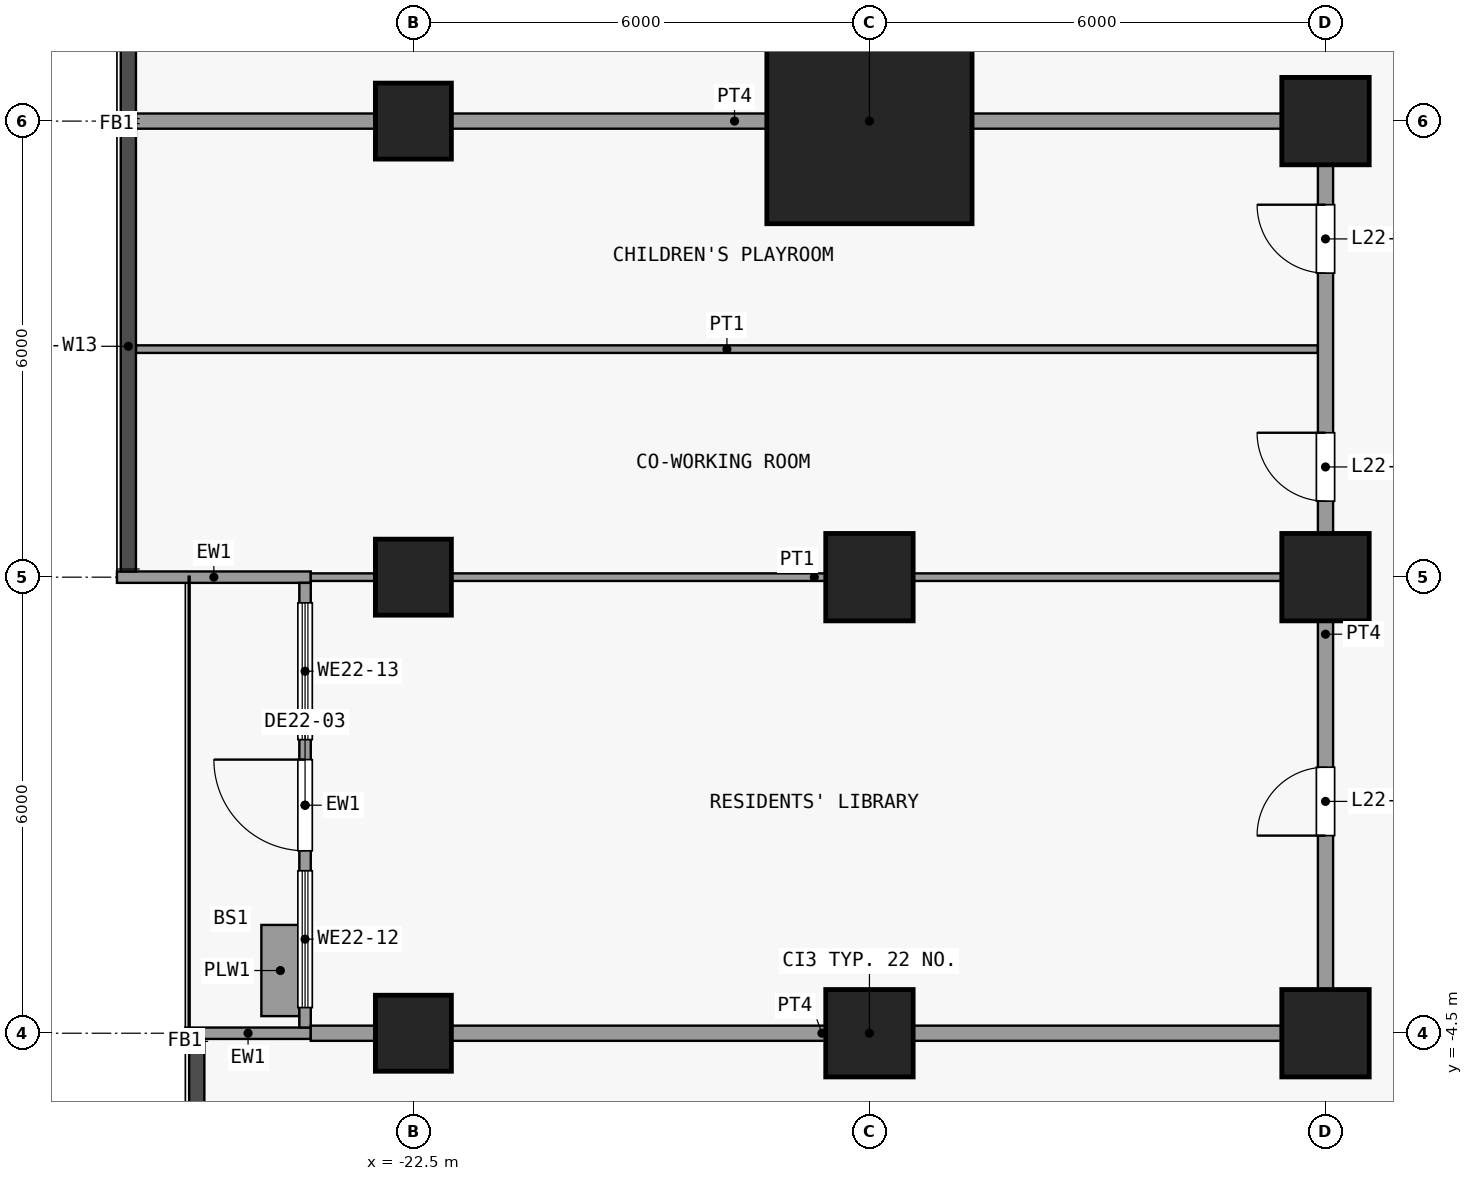
"""IFC4 building model, lengths in metres.
Left out: names, types, materials, properties, quantities, classifications, styles, units other than length and angle.
Written with IfcOpenShell. Run it as: python <this file> out.ifc"""

import sys

from ifc_helpers import new_model, si_unit, direction, frame, frame_2d, origin, origin_2d, place, context, subcontext, project, spatial, rectangle, extrude, element, fill, save


model = new_model("IFC4")
c1 = context("Model", 3, precision=1e-05, world=origin(), true_north=direction((0.0, 1.0)))
c2 = subcontext(c1, "Body", "Model", "MODEL_VIEW")
j1 = project(units=[si_unit("LENGTHUNIT", "METRE"), si_unit("PLANEANGLEUNIT", "RADIAN")], contexts=[c1])
p1 = place(None, origin())
s1 = spatial("IfcSite", under=j1, at=p1, CompositionType="ELEMENT")
p2 = place(p1, origin())
s2 = spatial("IfcBuilding", under=s1, at=p2, CompositionType="ELEMENT")
p3 = place(p2, frame((0.0, 0.0, 91.9)))
s3 = spatial("IfcBuildingStorey", under=s2, at=p3, CompositionType="ELEMENT", Elevation=91.9)
for number, where, z_axis, x_axis in (
    (1, (-22.5, -4.5, 0.0), (0.0, 0.0, 1.0), (1.0, 0.0, 0.0)),
    (2, (-22.5, 1.5, 0.0), (0.0, 0.0, 1.0), (1.0, 0.0, 0.0)),
    (3, (-22.5, 7.5, 0.0), (0.0, 0.0, 1.0), (1.0, 0.0, 0.0)),
):
    element("IfcColumn", number, at=place(p3, frame(where, z_axis=z_axis, x_axis=x_axis)), inside=s3, PredefinedType="COLUMN", context=c2, shape_type="SweptSolid", body=[
        extrude(rectangle(XDim=1.0, YDim=1.0, at=origin_2d()), origin(), (0.0, 0.0, 1.0), 3.6),
    ])
for number, where, z_axis, x_axis in (
    (4, (-16.5, -4.5, 0.0), (0.0, 0.0, 1.0), (1.0, 0.0, 0.0)),
    (5, (-16.5, 1.5, 0.0), (0.0, 0.0, 1.0), (1.0, 0.0, 0.0)),
):
    element("IfcColumn", number, at=place(p3, frame(where, z_axis=z_axis, x_axis=x_axis)), inside=s3, PredefinedType="COLUMN", context=c2, shape_type="SweptSolid", body=[
        extrude(rectangle(XDim=1.15, YDim=1.15, at=origin_2d()), origin(), (0.0, 0.0, 1.0), 3.6),
    ])
p4 = place(p3, frame((-16.5, 7.5, 0.0), z_axis=(0.0, 0.0, 1.0), x_axis=(1.0, 0.0, 0.0)))
e6 = element("IfcColumn", 6, at=p4, inside=s3, PredefinedType="COLUMN", context=c2, shape_type="SweptSolid", body=[
    extrude(rectangle(XDim=2.7, YDim=2.7, at=origin_2d()), origin(), (0.0, 0.0, 1.0), 3.6),
])
for number, where, z_axis, x_axis in (
    (7, (-10.5, -4.5, 0.0), (0.0, 0.0, 1.0), (1.0, 0.0, 0.0)),
    (8, (-10.5, 1.5, 0.0), (0.0, 0.0, 1.0), (1.0, 0.0, 0.0)),
    (9, (-10.5, 7.5, 0.0), (0.0, 0.0, 1.0), (1.0, 0.0, 0.0)),
):
    element("IfcColumn", number, at=place(p3, frame(where, z_axis=z_axis, x_axis=x_axis)), inside=s3, PredefinedType="COLUMN", context=c2, shape_type="SweptSolid", body=[
        extrude(rectangle(XDim=1.15, YDim=1.15, at=origin_2d()), origin(), (0.0, 0.0, 1.0), 3.6),
    ])
p5 = place(p3, frame((-23.85, -4.5, 0.0), z_axis=(0.0, 0.0, 1.0), x_axis=(-1.0, 0.0, 0.0)))
e10 = element("IfcWall", 10, at=p5, inside=s3, PredefinedType="SOLIDWALL", context=c2, shape_type="SweptSolid", body=[
    extrude(rectangle(XDim=1.65, YDim=0.15, at=frame_2d((0.825, 0.0))), origin(), (0.0, 0.0, 1.0), 3.3),
])
p6 = place(p3, frame((-23.85, 1.5, 0.0), z_axis=(0.0, 0.0, 1.0), x_axis=(-1.0, 0.0, 0.0)))
e11 = element("IfcWall", 11, at=p6, inside=s3, PredefinedType="SOLIDWALL", context=c2, shape_type="SweptSolid", body=[
    extrude(rectangle(XDim=2.55, YDim=0.15, at=frame_2d((1.275, 0.0))), origin(), (0.0, 0.0, 1.0), 3.3),
])
p7 = place(p3, frame((-23.925, -4.425, 0.0), z_axis=(0.0, 0.0, 1.0), x_axis=(0.0, 1.0, 0.0)))
e12 = element("IfcWall", 12, at=p7, inside=s3, PredefinedType="SOLIDWALL", context=c2, shape_type="SweptSolid", body=[
    extrude(rectangle(XDim=5.85, YDim=0.15, at=frame_2d((2.925, 0.0))), origin(), (0.0, 0.0, 1.0), 3.3),
])
p8 = place(p7, frame((2.325, 0.0, 0.0)))
e13 = element("IfcOpeningElement", 13, at=p8, cuts=e12, PredefinedType="OPENING", context=c2, shape_type="SweptSolid", body=[
    extrude(rectangle(XDim=1.2, YDim=2.4, at=frame_2d((0.6, 1.2))), frame((0.0, 0.085, 0.0), z_axis=(0.0, -1.0, 0.0), x_axis=(1.0, 0.0, 0.0)), (0.0, 0.0, 1.0), 0.17),
])
p9 = place(p7, frame((0.262, 0.0, 0.9)))
e14 = element("IfcOpeningElement", 14, at=p9, cuts=e12, PredefinedType="OPENING", context=c2, shape_type="SweptSolid", body=[
    extrude(rectangle(XDim=1.8, YDim=2.1, at=frame_2d((0.9, 1.05))), frame((0.0, 0.085, 0.0), z_axis=(0.0, -1.0, 0.0), x_axis=(1.0, 0.0, 0.0)), (0.0, 0.0, 1.0), 0.17),
])
p10 = place(p7, frame((3.788, 0.0, 0.9)))
e15 = element("IfcOpeningElement", 15, at=p10, cuts=e12, PredefinedType="OPENING", context=c2, shape_type="SweptSolid", body=[
    extrude(rectangle(XDim=1.8, YDim=2.1, at=frame_2d((0.9, 1.05))), frame((0.0, 0.085, 0.0), z_axis=(0.0, -1.0, 0.0), x_axis=(1.0, 0.0, 0.0)), (0.0, 0.0, 1.0), 0.17),
])
p11 = place(p3, frame((-24.25, -4.275, 0.0), z_axis=(0.0, 0.0, 1.0), x_axis=(0.0, 1.0, 0.0)))
e16 = element("IfcWall", 16, at=p11, inside=s3, PredefinedType="USERDEFINED", context=c2, shape_type="SweptSolid", body=[
    extrude(rectangle(XDim=1.2, YDim=0.5, at=frame_2d((0.6, 0.0))), origin(), (0.0, 0.0, 1.0), 0.9),
])
p12 = place(p3, frame((-23.85, -4.5, 0.0), z_axis=(0.0, 0.0, 1.0), x_axis=(1.0, 0.0, 0.0)))
e17 = element("IfcWall", 17, at=p12, inside=s3, PredefinedType="PARTITIONING", context=c2, shape_type="SweptSolid", body=[
    extrude(rectangle(XDim=13.45, YDim=0.2, at=frame_2d((6.725, 0.0))), origin(), (0.0, 0.0, 1.0), 3.3),
])
p13 = place(p3, frame((-23.85, 1.5, 0.0), z_axis=(0.0, 0.0, 1.0), x_axis=(1.0, 0.0, 0.0)))
e18 = element("IfcWall", 18, at=p13, inside=s3, PredefinedType="PARTITIONING", context=c2, shape_type="SweptSolid", body=[
    extrude(rectangle(XDim=13.25, YDim=0.1, at=frame_2d((6.625, 0.0))), origin(), (0.0, 0.0, 1.0), 3.3),
])
p14 = place(p3, frame((-26.15, 4.5, 0.0), z_axis=(0.0, 0.0, 1.0), x_axis=(1.0, 0.0, 0.0)))
e19 = element("IfcWall", 19, at=p14, inside=s3, PredefinedType="PARTITIONING", context=c2, shape_type="SweptSolid", body=[
    extrude(rectangle(XDim=15.55, YDim=0.1, at=frame_2d((7.775, 0.0))), origin(), (0.0, 0.0, 1.0), 3.3),
])
p15 = place(p3, frame((-26.15, 7.5, 0.0), z_axis=(0.0, 0.0, 1.0), x_axis=(1.0, 0.0, 0.0)))
e20 = element("IfcWall", 20, at=p15, inside=s3, PredefinedType="PARTITIONING", context=c2, shape_type="SweptSolid", body=[
    extrude(rectangle(XDim=15.75, YDim=0.2, at=frame_2d((7.875, 0.0))), origin(), (0.0, 0.0, 1.0), 3.3),
])
p16 = place(p3, frame((-10.5, -4.4, 0.0), z_axis=(0.0, 0.0, 1.0), x_axis=(0.0, 1.0, 0.0)))
e21 = element("IfcWall", 21, at=p16, inside=s3, PredefinedType="PARTITIONING", context=c2, shape_type="SweptSolid", body=[
    extrude(rectangle(XDim=11.8, YDim=0.2, at=frame_2d((5.9, 0.0))), origin(), (0.0, 0.0, 1.0), 3.3),
])
p17 = place(p16, frame((2.5, 0.0, 0.0)))
e22 = element("IfcOpeningElement", 22, at=p17, cuts=e21, PredefinedType="OPENING", context=c2, shape_type="SweptSolid", body=[
    extrude(rectangle(XDim=0.9, YDim=2.1, at=frame_2d((0.45, 1.05))), frame((0.0, 0.11, 0.0), z_axis=(0.0, -1.0, 0.0), x_axis=(1.0, 0.0, 0.0)), (0.0, 0.0, 1.0), 0.22),
])
p18 = place(p16, frame((6.9, 0.0, 0.0)))
e23 = element("IfcOpeningElement", 23, at=p18, cuts=e21, PredefinedType="OPENING", context=c2, shape_type="SweptSolid", body=[
    extrude(rectangle(XDim=0.9, YDim=2.1, at=frame_2d((0.45, 1.05))), frame((0.0, 0.11, 0.0), z_axis=(0.0, -1.0, 0.0), x_axis=(1.0, 0.0, 0.0)), (0.0, 0.0, 1.0), 0.22),
])
p19 = place(p16, frame((9.9, 0.0, 0.0)))
e24 = element("IfcOpeningElement", 24, at=p19, cuts=e21, PredefinedType="OPENING", context=c2, shape_type="SweptSolid", body=[
    extrude(rectangle(XDim=0.9, YDim=2.1, at=frame_2d((0.45, 1.05))), frame((0.0, 0.11, 0.0), z_axis=(0.0, -1.0, 0.0), x_axis=(1.0, 0.0, 0.0)), (0.0, 0.0, 1.0), 0.22),
])
p20 = place(p8, origin())
e25 = element("IfcDoor", 25, at=p20, inside=s3, OperationType="SINGLE_SWING_RIGHT", PredefinedType="DOOR", context=c2, shape_type="SweptSolid", body=[
    extrude(rectangle(XDim=1.2, YDim=2.4, at=frame_2d((0.6, 1.2))), frame((0.0, 0.025, 0.0), z_axis=(0.0, -1.0, 0.0), x_axis=(1.0, 0.0, 0.0)), (0.0, 0.0, 1.0), 0.05),
])
fill(e13, e25)
p21 = place(p9, origin())
e26 = element("IfcWindow", 26, at=p21, inside=s3, PartitioningType="SINGLE_PANEL", PredefinedType="WINDOW", context=c2, shape_type="SweptSolid", body=[
    extrude(rectangle(XDim=1.8, YDim=2.1, at=frame_2d((0.9, 1.05))), frame((0.0, 0.03, 0.0), z_axis=(0.0, -1.0, 0.0), x_axis=(1.0, 0.0, 0.0)), (0.0, 0.0, 1.0), 0.06),
])
fill(e14, e26)
p22 = place(p10, origin())
e27 = element("IfcWindow", 27, at=p22, inside=s3, PartitioningType="SINGLE_PANEL", PredefinedType="WINDOW", context=c2, shape_type="SweptSolid", body=[
    extrude(rectangle(XDim=1.8, YDim=2.1, at=frame_2d((0.9, 1.05))), frame((0.0, 0.03, 0.0), z_axis=(0.0, -1.0, 0.0), x_axis=(1.0, 0.0, 0.0)), (0.0, 0.0, 1.0), 0.06),
])
fill(e15, e27)
p23 = place(p17, origin())
e28 = element("IfcDoor", 28, at=p23, inside=s3, OperationType="SINGLE_SWING_RIGHT", PredefinedType="DOOR", context=c2, shape_type="SweptSolid", body=[
    extrude(rectangle(XDim=0.9, YDim=2.1, at=frame_2d((0.45, 1.05))), frame((0.0, 0.025, 0.0), z_axis=(0.0, -1.0, 0.0), x_axis=(1.0, 0.0, 0.0)), (0.0, 0.0, 1.0), 0.05),
])
fill(e22, e28)
p24 = place(p18, origin())
e29 = element("IfcDoor", 29, at=p24, inside=s3, OperationType="SINGLE_SWING_LEFT", PredefinedType="DOOR", context=c2, shape_type="SweptSolid", body=[
    extrude(rectangle(XDim=0.9, YDim=2.1, at=frame_2d((0.45, 1.05))), frame((0.0, 0.025, 0.0), z_axis=(0.0, -1.0, 0.0), x_axis=(1.0, 0.0, 0.0)), (0.0, 0.0, 1.0), 0.05),
])
fill(e23, e29)
p25 = place(p19, origin())
e30 = element("IfcDoor", 30, at=p25, inside=s3, OperationType="SINGLE_SWING_LEFT", PredefinedType="DOOR", context=c2, shape_type="SweptSolid", body=[
    extrude(rectangle(XDim=0.9, YDim=2.1, at=frame_2d((0.45, 1.05))), frame((0.0, 0.025, 0.0), z_axis=(0.0, -1.0, 0.0), x_axis=(1.0, 0.0, 0.0)), (0.0, 0.0, 1.0), 0.05),
])
fill(e24, e30)
save(model, sys.argv[1])
